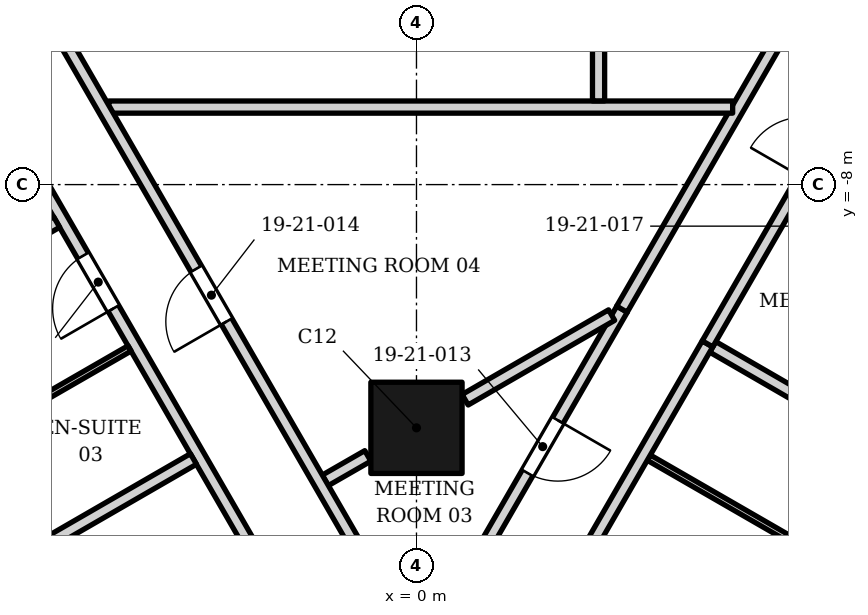
"""IFC4 building model, lengths in metres.
Left out: names, types, materials, properties, quantities, classifications, styles, units other than length and angle.
Written with IfcOpenShell. Run it as: python <this file> out.ifc"""

import sys

from ifc_helpers import new_model, si_unit, direction, frame, frame_2d, origin, origin_2d, place, context, subcontext, project, spatial, rectangle, extrude, element, fill, save


model = new_model("IFC4")
c1 = context("Model", 3, precision=1e-05, world=origin(), true_north=direction((0.0, 1.0)))
c2 = subcontext(c1, "Body", "Model", "MODEL_VIEW")
j1 = project(units=[si_unit("LENGTHUNIT", "METRE"), si_unit("PLANEANGLEUNIT", "RADIAN")], contexts=[c1])
p1 = place(None, origin())
s1 = spatial("IfcSite", under=j1, at=p1, CompositionType="ELEMENT")
p2 = place(p1, origin())
s2 = spatial("IfcBuilding", under=s1, at=p2, CompositionType="ELEMENT")
p3 = place(p2, frame((0.0, 0.0, 91.8)))
s3 = spatial("IfcBuildingStorey", under=s2, at=p3, CompositionType="ELEMENT", Elevation=91.8)
p4 = place(p3, frame((0.0, -12.0, 0.0), z_axis=(0.0, 0.0, 1.0), x_axis=(1.0, 0.0, 0.0)))
e1 = element("IfcColumn", 1, at=p4, inside=s3, PredefinedType="COLUMN", context=c2, shape_type="SweptSolid", body=[
    extrude(rectangle(XDim=1.5, YDim=1.5, at=origin_2d()), origin(), (0.0, 0.0, 1.0), 3.4),
])
p5 = place(p3, frame((-10.334, -0.77, 0.0), z_axis=(0.0, 0.0, 1.0), x_axis=(0.499996405163, -0.866027479255, 0.0)))
e2 = element("IfcWall", 2, at=p5, inside=s3, PredefinedType="PARTITIONING", context=c2, shape_type="SweptSolid", body=[
    extrude(rectangle(XDim=20.803, YDim=0.2, at=frame_2d((10.401, 0.0))), origin(), (0.0, 0.0, 1.0), 2.384),
])
p6 = place(p5, frame((4.0, 0.0, 0.0)))
e3 = element("IfcOpeningElement", 3, at=p6, cuts=e2, PredefinedType="OPENING", context=c2, shape_type="SweptSolid", body=[
    extrude(rectangle(XDim=1.0, YDim=2.1, at=frame_2d((0.5, 1.05))), frame((0.0, 0.11, 0.0), z_axis=(0.0, -1.0, 0.0), x_axis=(1.0, 0.0, 0.0)), (0.0, 0.0, 1.0), 0.22),
])
p7 = place(p5, frame((9.7, 0.0, 0.0)))
e4 = element("IfcOpeningElement", 4, at=p7, cuts=e2, PredefinedType="OPENING", context=c2, shape_type="SweptSolid", body=[
    extrude(rectangle(XDim=1.0, YDim=2.1, at=frame_2d((0.5, 1.05))), frame((0.0, 0.11, 0.0), z_axis=(0.0, -1.0, 0.0), x_axis=(1.0, 0.0, 0.0)), (0.0, 0.0, 1.0), 0.22),
])
p8 = place(p5, frame((16.6, 0.0, 0.0)))
e5 = element("IfcOpeningElement", 5, at=p8, cuts=e2, PredefinedType="OPENING", context=c2, shape_type="SweptSolid", body=[
    extrude(rectangle(XDim=1.1, YDim=2.1, at=frame_2d((0.55, 1.05))), frame((0.0, 0.11, 0.0), z_axis=(0.0, -1.0, 0.0), x_axis=(1.0, 0.0, 0.0)), (0.0, 0.0, 1.0), 0.22),
])
p9 = place(p5, frame((18.852, 0.0, 0.0)))
e6 = element("IfcOpeningElement", 6, at=p9, cuts=e2, PredefinedType="OPENING", context=c2, shape_type="SweptSolid", body=[
    extrude(rectangle(XDim=1.1, YDim=2.1, at=frame_2d((0.55, 1.05))), frame((0.0, 0.11, 0.0), z_axis=(0.0, -1.0, 0.0), x_axis=(1.0, 0.0, 0.0)), (0.0, 0.0, 1.0), 0.22),
])
p10 = place(p3, frame((0.119, -15.698, 0.0), z_axis=(0.0, 0.0, 1.0), x_axis=(0.499994537821, 0.866028557352, 0.0)))
e7 = element("IfcWall", 7, at=p10, inside=s3, PredefinedType="PARTITIONING", context=c2, shape_type="SweptSolid", body=[
    extrude(rectangle(XDim=6.524, YDim=0.2, at=frame_2d((3.262, 0.0))), origin(), (0.0, 0.0, 1.0), 2.302),
])
p11 = place(p10, frame((3.413, 0.0, 0.0)))
e8 = element("IfcOpeningElement", 8, at=p11, cuts=e7, PredefinedType="OPENING", context=c2, shape_type="SweptSolid", body=[
    extrude(rectangle(XDim=1.0, YDim=2.1, at=frame_2d((0.5, 1.05))), frame((0.0, 0.11, 0.0), z_axis=(0.0, -1.0, 0.0), x_axis=(1.0, 0.0, 0.0)), (0.0, 0.0, 1.0), 0.22),
])
p12 = place(p3, frame((3.82, -12.49, 0.0), z_axis=(0.0, 0.0, 1.0), x_axis=(0.866326367614, -0.499478352661, 0.0)))
e9 = element("IfcWall", 9, at=p12, inside=s3, PredefinedType="PARTITIONING", context=c2, shape_type="SweptSolid", body=[
    extrude(rectangle(XDim=2.8, YDim=0.1, at=frame_2d((1.4, 0.0))), origin(), (0.0, 0.0, 1.0), 2.552),
])
p13 = place(p3, frame((-1.501, -12.865, 0.0), z_axis=(0.0, 0.0, 1.0), x_axis=(0.86708889474, 0.49815343883, 0.0)))
e10 = element("IfcWall", 10, at=p13, inside=s3, PredefinedType="PARTITIONING", context=c2, shape_type="SweptSolid", body=[
    extrude(rectangle(XDim=0.809, YDim=0.2, at=frame_2d((0.404, 0.0))), origin(), (0.0, 0.0, 1.0), 3.23),
])
p14 = place(p3, frame((-6.179, -13.962, 0.0), z_axis=(0.0, 0.0, 1.0), x_axis=(0.866011727401, 0.500023687443, 0.0)))
e11 = element("IfcWall", 11, at=p14, inside=s3, PredefinedType="PARTITIONING", context=c2, shape_type="SweptSolid", body=[
    extrude(rectangle(XDim=2.9, YDim=0.2, at=frame_2d((1.45, 0.0))), origin(), (0.0, 0.0, 1.0), 2.628),
])
p15 = place(p3, frame((0.8, -11.538, 0.0), z_axis=(0.0, 0.0, 1.0), x_axis=(0.865884499667, 0.500243973713, 0.0)))
e12 = element("IfcWall", 12, at=p15, inside=s3, PredefinedType="PARTITIONING", context=c2, shape_type="SweptSolid", body=[
    extrude(rectangle(XDim=2.782, YDim=0.2, at=frame_2d((1.391, 0.0))), origin(), (0.0, 0.0, 1.0), 3.23),
])
p16 = place(p3, frame((-7.057, -12.042, 0.0), z_axis=(0.0, 0.0, 1.0), x_axis=(0.866339109022, 0.499456252518, 0.0)))
e13 = element("IfcWall", 13, at=p16, inside=s3, PredefinedType="PARTITIONING", context=c2, shape_type="SweptSolid", body=[
    extrude(rectangle(XDim=2.7, YDim=0.1, at=frame_2d((1.35, 0.0))), origin(), (0.0, 0.0, 1.0), 2.45),
])
p17 = place(p3, frame((4.873, -10.669, 0.0), z_axis=(0.0, 0.0, 1.0), x_axis=(0.865664803183, -0.500624059081, 0.0)))
e14 = element("IfcWall", 14, at=p17, inside=s3, PredefinedType="PARTITIONING", context=c2, shape_type="SweptSolid", body=[
    extrude(rectangle(XDim=2.148, YDim=0.2, at=frame_2d((1.074, 0.0))), origin(), (0.0, 0.0, 1.0), 3.23),
])
p18 = place(p3, frame((0.285, -18.415, 0.0), z_axis=(0.0, 0.0, 1.0), x_axis=(0.5000018851, 0.866024315419, 0.0)))
e15 = element("IfcWall", 15, at=p18, inside=s3, PredefinedType="PARTITIONING", context=c2, shape_type="SweptSolid", body=[
    extrude(rectangle(XDim=9.0, YDim=0.2, at=frame_2d((4.5, 0.0))), origin(), (0.0, 0.0, 1.0), 2.302),
])
p19 = place(p18, frame((0.8, 0.0, 0.0)))
e16 = element("IfcOpeningElement", 16, at=p19, cuts=e15, PredefinedType="OPENING", context=c2, shape_type="SweptSolid", body=[
    extrude(rectangle(XDim=1.1, YDim=2.1, at=frame_2d((0.55, 1.05))), frame((0.0, 0.11, 0.0), z_axis=(0.0, -1.0, 0.0), x_axis=(1.0, 0.0, 0.0)), (0.0, 0.0, 1.0), 0.22),
])
p20 = place(p3, frame((3.379, -10.049, 0.0), z_axis=(0.0, 0.0, 1.0), x_axis=(0.50000242408, 0.866024004237, 0.0)))
e17 = element("IfcWall", 17, at=p20, inside=s3, PredefinedType="PARTITIONING", context=c2, shape_type="SweptSolid", body=[
    extrude(rectangle(XDim=15.877, YDim=0.2, at=frame_2d((7.938, 0.0))), origin(), (0.0, 0.0, 1.0), 2.384),
])
p21 = place(p20, frame((9.359, 0.0, 0.0)))
e18 = element("IfcOpeningElement", 18, at=p21, cuts=e17, PredefinedType="OPENING", context=c2, shape_type="SweptSolid", body=[
    extrude(rectangle(XDim=1.0, YDim=2.1, at=frame_2d((0.5, 1.05))), frame((0.0, 0.11, 0.0), z_axis=(0.0, -1.0, 0.0), x_axis=(1.0, 0.0, 0.0)), (0.0, 0.0, 1.0), 0.22),
])
p22 = place(p3, frame((-10.292, -11.138, 0.0), z_axis=(0.0, 0.0, 1.0), x_axis=(0.866188805601, 0.49971687289, 0.0)))
e19 = element("IfcWall", 19, at=p22, inside=s3, PredefinedType="PARTITIONING", context=c2, shape_type="SweptSolid", body=[
    extrude(rectangle(XDim=5.05, YDim=0.2, at=frame_2d((2.525, 0.0))), origin(), (0.0, 0.0, 1.0), 2.552),
])
p23 = place(p3, frame((4.786, -10.619, 0.0), z_axis=(0.0, 0.0, 1.0), x_axis=(0.500007539231, 0.866021050964, 0.0)))
e20 = element("IfcWall", 20, at=p23, inside=s3, PredefinedType="PARTITIONING", context=c2, shape_type="SweptSolid", body=[
    extrude(rectangle(XDim=4.398, YDim=0.2, at=frame_2d((2.199, 0.0))), origin(), (0.0, 0.0, 1.0), 3.23),
])
p24 = place(p23, frame((3.15, 0.0, 0.0)))
e21 = element("IfcOpeningElement", 21, at=p24, cuts=e20, PredefinedType="OPENING", context=c2, shape_type="SweptSolid", body=[
    extrude(rectangle(XDim=1.0, YDim=2.1, at=frame_2d((0.5, 1.05))), frame((0.0, 0.11, 0.0), z_axis=(0.0, -1.0, 0.0), x_axis=(1.0, 0.0, 0.0)), (0.0, 0.0, 1.0), 0.22),
])
p25 = place(p3, frame((-5.061, -6.725, 0.0), z_axis=(0.0, 0.0, 1.0), x_axis=(1.0, 0.0, 0.0)))
e22 = element("IfcWall", 22, at=p25, inside=s3, PredefinedType="PARTITIONING", context=c2, shape_type="SweptSolid", body=[
    extrude(rectangle(XDim=10.261, YDim=0.2, at=frame_2d((5.13, 0.0))), origin(), (0.0, 0.0, 1.0), 2.384),
])
p26 = place(p3, frame((2.994, -6.623, 0.0), z_axis=(0.0, 0.0, 1.0), x_axis=(0.000215209959, 0.999999976842, 0.0)))
e23 = element("IfcWall", 23, at=p26, inside=s3, PredefinedType="PARTITIONING", context=c2, shape_type="SweptSolid", body=[
    extrude(rectangle(XDim=9.075, YDim=0.2, at=frame_2d((4.538, 0.0))), origin(), (0.0, 0.0, 1.0), 3.23),
])
p27 = place(p3, frame((-11.18, 3.7, 0.0), z_axis=(0.0, 0.0, 1.0), x_axis=(0.500129162475, -0.865950818951, 0.0)))
e24 = element("IfcWall", 24, at=p27, inside=s3, PredefinedType="PARTITIONING", context=c2, shape_type="SweptSolid", body=[
    extrude(rectangle(XDim=22.499, YDim=0.2, at=frame_2d((11.249, 0.0))), origin(), (0.0, 0.0, 1.0), 2.384),
])
p28 = place(p27, frame((9.13, 0.0, 0.0)))
e25 = element("IfcOpeningElement", 25, at=p28, cuts=e24, PredefinedType="OPENING", context=c2, shape_type="SweptSolid", body=[
    extrude(rectangle(XDim=1.0, YDim=2.1, at=frame_2d((0.5, 1.05))), frame((0.0, 0.11, 0.0), z_axis=(0.0, -1.0, 0.0), x_axis=(1.0, 0.0, 0.0)), (0.0, 0.0, 1.0), 0.22),
])
p29 = place(p27, frame((15.111, 0.0, 0.0)))
e26 = element("IfcOpeningElement", 26, at=p29, cuts=e24, PredefinedType="OPENING", context=c2, shape_type="SweptSolid", body=[
    extrude(rectangle(XDim=1.0, YDim=2.1, at=frame_2d((0.5, 1.05))), frame((0.0, 0.11, 0.0), z_axis=(0.0, -1.0, 0.0), x_axis=(1.0, 0.0, 0.0)), (0.0, 0.0, 1.0), 0.22),
])
p30 = place(p27, frame((5.834, 0.0, 0.0)))
e27 = element("IfcOpeningElement", 27, at=p30, cuts=e24, PredefinedType="OPENING", context=c2, shape_type="SweptSolid", body=[
    extrude(rectangle(XDim=1.0, YDim=2.1, at=frame_2d((0.5, 1.05))), frame((0.0, 0.11, 0.0), z_axis=(0.0, -1.0, 0.0), x_axis=(1.0, 0.0, 0.0)), (0.0, 0.0, 1.0), 0.22),
])
p31 = place(p7, origin())
e28 = element("IfcDoor", 28, at=p31, inside=s3, OperationType="SINGLE_SWING_RIGHT", PredefinedType="DOOR", context=c2, shape_type="SweptSolid", body=[
    extrude(rectangle(XDim=1.0, YDim=2.1, at=frame_2d((0.5, 1.05))), frame((0.0, 0.025, 0.0), z_axis=(0.0, -1.0, 0.0), x_axis=(1.0, 0.0, 0.0)), (0.0, 0.0, 1.0), 0.05),
])
fill(e4, e28)
p32 = place(p11, origin())
e29 = element("IfcDoor", 29, at=p32, inside=s3, OperationType="SINGLE_SWING_RIGHT", PredefinedType="DOOR", context=c2, shape_type="SweptSolid", body=[
    extrude(rectangle(XDim=1.0, YDim=2.1, at=frame_2d((0.5, 1.05))), frame((0.0, 0.025, 0.0), z_axis=(0.0, -1.0, 0.0), x_axis=(1.0, 0.0, 0.0)), (0.0, 0.0, 1.0), 0.05),
])
fill(e8, e29)
p33 = place(p29, origin())
e30 = element("IfcDoor", 30, at=p33, inside=s3, OperationType="SINGLE_SWING_RIGHT", PredefinedType="DOOR", context=c2, shape_type="SweptSolid", body=[
    extrude(rectangle(XDim=1.0, YDim=2.1, at=frame_2d((0.5, 1.05))), frame((0.0, 0.025, 0.0), z_axis=(0.0, -1.0, 0.0), x_axis=(1.0, 0.0, 0.0)), (0.0, 0.0, 1.0), 0.05),
])
fill(e26, e30)
save(model, sys.argv[1])
